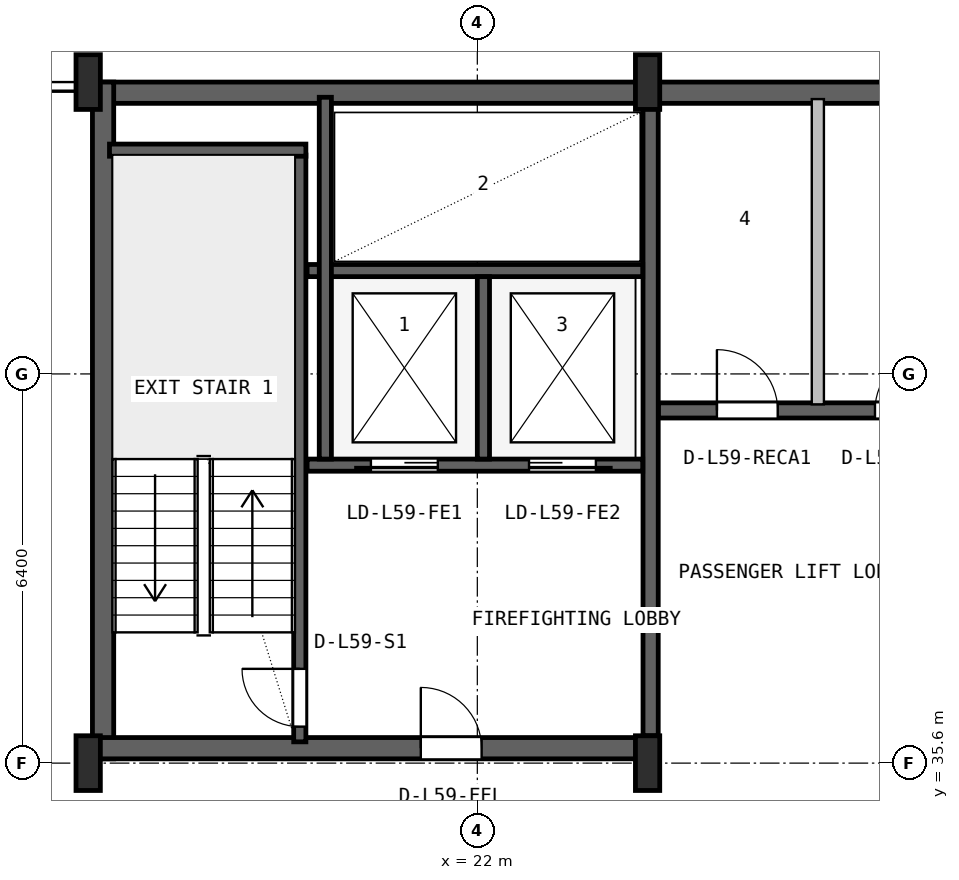
"""IFC4 building model, lengths in metres.
Left out: names, types, materials, properties, quantities, classifications, styles, units other than length and angle.
Written with IfcOpenShell. Run it as: python <this file> out.ifc"""

import sys

from ifc_helpers import new_model, si_unit, direction, frame, frame_2d, origin, origin_2d, place, context, subcontext, project, spatial, rectangle, i_section, extrude, source, transform, mapped, element, fill, save


model = new_model("IFC4")
c1 = context("Model", 3, precision=1e-05, world=origin(), true_north=direction((0.0, 1.0)))
c2 = subcontext(c1, "Body", "Model", "MODEL_VIEW")
j1 = project(units=[si_unit("LENGTHUNIT", "METRE"), si_unit("PLANEANGLEUNIT", "RADIAN")], contexts=[c1])
p1 = place(None, origin())
s1 = spatial("IfcSite", under=j1, at=p1, CompositionType="ELEMENT")
p2 = place(p1, origin())
s2 = spatial("IfcBuilding", under=s1, at=p2, CompositionType="ELEMENT")
p3 = place(p2, frame((0.0, 0.0, 239.4)))
s3 = spatial("IfcBuildingStorey", under=s2, at=p3, CompositionType="ELEMENT", Elevation=239.4)
p4 = place(p3, frame((15.6, 46.625, 0.0), z_axis=(0.0, 0.0, 1.0), x_axis=(1.0, 0.0, 0.0)))
e1 = element("IfcWall", 1, at=p4, inside=s3, PredefinedType="SHEAR", context=c2, shape_type="SweptSolid", body=[
    extrude(rectangle(XDim=36.8, YDim=0.35, at=frame_2d((18.4, 0.0))), origin(), (0.0, 0.0, 1.0), 3.55),
])
p5 = place(p3, frame((15.845, 35.67, 0.0), z_axis=(0.0, 0.0, 1.0), x_axis=(0.0, 1.0, 0.0)))
e2 = element("IfcWall", 2, at=p5, inside=s3, PredefinedType="SHEAR", context=c2, shape_type="SweptSolid", body=[
    extrude(rectangle(XDim=11.13, YDim=0.35, at=frame_2d((5.565, 0.0))), origin(), (0.0, 0.0, 1.0), 3.55),
])
p6 = place(p3, frame((15.67, 35.845, 0.0), z_axis=(0.0, 0.0, 1.0), x_axis=(1.0, 0.0, 0.0)))
e3 = element("IfcWall", 3, at=p6, inside=s3, PredefinedType="SHEAR", context=c2, shape_type="SweptSolid", body=[
    extrude(rectangle(XDim=9.13, YDim=0.35, at=frame_2d((4.565, 0.0))), origin(), (0.0, 0.0, 1.0), 3.55),
])
p7 = place(p6, frame((5.4, 0.0, 0.0)))
e4 = element("IfcOpeningElement", 4, at=p7, cuts=e3, PredefinedType="OPENING", context=c2, shape_type="SweptSolid", body=[
    extrude(rectangle(XDim=1.0, YDim=2.1, at=frame_2d((0.5, 1.05))), frame((0.0, 0.185, 0.0), z_axis=(0.0, -1.0, 0.0), x_axis=(1.0, 0.0, 0.0)), (0.0, 0.0, 1.0), 0.37),
])
m1 = source(origin(), c2, "Body", "SweptSolid", [
    extrude(i_section(OverallWidth=0.4, OverallDepth=0.9, WebThickness=0.016, FlangeThickness=0.028, FilletRadius=0.016, at=origin_2d()), origin(), (0.0, 0.0, 1.0), 3.8),
])
for number, where, z_axis, x_axis in (
    (5, (15.6, 35.6, 0.0), (0.0, 0.0, 1.0), (1.0, 0.0, 0.0)),
    (6, (15.6, 46.8, 0.0), (0.0, 0.0, 1.0), (1.0, 0.0, 0.0)),
    (7, (24.8, 35.6, 0.0), (0.0, 0.0, 1.0), (1.0, 0.0, 0.0)),
    (8, (24.8, 46.8, 0.0), (0.0, 0.0, 1.0), (1.0, 0.0, 0.0)),
):
    element("IfcColumn", number, at=place(p3, frame(where, z_axis=z_axis, x_axis=x_axis)), inside=s3, PredefinedType="COLUMN", context=c2, shape_type="MappedRepresentation", body=[
        mapped(m1, transform((0.0, 0.0, 0.0), x_axis=(1.0, 0.0, 0.0), y_axis=(0.0, 1.0, 0.0), z_axis=(0.0, 0.0, 1.0), scale=1.0)),
    ])
p8 = place(p3, frame((19.08, 35.95, 0.0), z_axis=(0.0, 0.0, 1.0), x_axis=(0.0, 1.0, 0.0)))
e9 = element("IfcWall", 9, at=p8, inside=s3, PredefinedType="SHEAR", context=c2, shape_type="SweptSolid", body=[
    extrude(rectangle(XDim=9.65, YDim=0.2, at=frame_2d((4.825, 0.0))), origin(), (0.0, 0.0, 1.0), 3.55),
])
p9 = place(p8, frame((0.25, 0.0, 0.0)))
e10 = element("IfcOpeningElement", 10, at=p9, cuts=e9, PredefinedType="OPENING", context=c2, shape_type="SweptSolid", body=[
    extrude(rectangle(XDim=0.95, YDim=2.1, at=frame_2d((0.475, 1.05))), frame((0.0, 0.11, 0.0), z_axis=(0.0, -1.0, 0.0), x_axis=(1.0, 0.0, 0.0)), (0.0, 0.0, 1.0), 0.22),
])
p10 = place(p3, frame((15.95, 45.68, 0.0), z_axis=(0.0, 0.0, 1.0), x_axis=(1.0, 0.0, 0.0)))
e11 = element("IfcWall", 11, at=p10, inside=s3, PredefinedType="SHEAR", context=c2, shape_type="SweptSolid", body=[
    extrude(rectangle(XDim=3.23, YDim=0.2, at=frame_2d((1.615, 0.0))), origin(), (0.0, 0.0, 1.0), 3.55),
])
p11 = place(p3, frame((24.85, 36.05, 0.0), z_axis=(0.0, 0.0, 1.0), x_axis=(0.0, 1.0, 0.0)))
e12 = element("IfcWall", 12, at=p11, inside=s3, PredefinedType="SHEAR", context=c2, shape_type="SweptSolid", body=[
    extrude(rectangle(XDim=10.45, YDim=0.25, at=frame_2d((5.225, 0.0))), origin(), (0.0, 0.0, 1.0), 3.55),
])
p12 = place(p3, frame((19.2, 40.5, 0.0), z_axis=(0.0, 0.0, 1.0), x_axis=(1.0, 0.0, 0.0)))
e13 = element("IfcWall", 13, at=p12, inside=s3, PredefinedType="SHEAR", context=c2, shape_type="SweptSolid", body=[
    extrude(rectangle(XDim=5.52, YDim=0.2, at=frame_2d((2.76, 0.0))), origin(), (0.0, 0.0, 1.0), 3.55),
])
p13 = place(p12, frame((1.05, 0.0, 0.0)))
e14 = element("IfcOpeningElement", 14, at=p13, cuts=e13, PredefinedType="OPENING", context=c2, shape_type="SweptSolid", body=[
    extrude(rectangle(XDim=1.1, YDim=2.18, at=frame_2d((0.55, 1.09))), frame((0.0, 0.11, 0.0), z_axis=(0.0, -1.0, 0.0), x_axis=(1.0, 0.0, 0.0)), (0.0, 0.0, 1.0), 0.22),
])
p14 = place(p12, frame((3.65, 0.0, 0.0)))
e15 = element("IfcOpeningElement", 15, at=p14, cuts=e13, PredefinedType="OPENING", context=c2, shape_type="SweptSolid", body=[
    extrude(rectangle(XDim=1.1, YDim=2.18, at=frame_2d((0.55, 1.09))), frame((0.0, 0.11, 0.0), z_axis=(0.0, -1.0, 0.0), x_axis=(1.0, 0.0, 0.0)), (0.0, 0.0, 1.0), 0.22),
])
p15 = place(p3, frame((19.2, 43.7, 0.0), z_axis=(0.0, 0.0, 1.0), x_axis=(1.0, 0.0, 0.0)))
e16 = element("IfcWall", 16, at=p15, inside=s3, PredefinedType="SHEAR", context=c2, shape_type="SweptSolid", body=[
    extrude(rectangle(XDim=5.52, YDim=0.2, at=frame_2d((2.76, 0.0))), origin(), (0.0, 0.0, 1.0), 3.55),
])
p16 = place(p3, frame((22.1, 40.6, 0.0), z_axis=(0.0, 0.0, 1.0), x_axis=(0.0, 1.0, 0.0)))
e17 = element("IfcWall", 17, at=p16, inside=s3, PredefinedType="SHEAR", context=c2, shape_type="SweptSolid", body=[
    extrude(rectangle(XDim=3.0, YDim=0.2, at=frame_2d((1.5, 0.0))), origin(), (0.0, 0.0, 1.0), 3.55),
])
p17 = place(p3, frame((19.5, 40.6, 0.0), z_axis=(0.0, 0.0, 1.0), x_axis=(0.0, 1.0, 0.0)))
e18 = element("IfcWall", 18, at=p17, inside=s3, PredefinedType="SHEAR", context=c2, shape_type="SweptSolid", body=[
    extrude(rectangle(XDim=5.95, YDim=0.2, at=frame_2d((2.975, 0.0))), origin(), (0.0, 0.0, 1.0), 3.55),
])
p18 = place(p3, frame((24.98, 41.4, 0.0), z_axis=(0.0, 0.0, 1.0), x_axis=(1.0, 0.0, 0.0)))
e19 = element("IfcWall", 19, at=p18, inside=s3, PredefinedType="SHEAR", context=c2, shape_type="SweptSolid", body=[
    extrude(rectangle(XDim=23.82, YDim=0.25, at=frame_2d((11.91, 0.0))), origin(), (0.0, 0.0, 1.0), 3.55),
])
p19 = place(p18, frame((16.87, 0.0, 0.0)))
e20 = element("IfcOpeningElement", 20, at=p19, cuts=e19, PredefinedType="OPENING", context=c2, shape_type="SweptSolid", body=[
    extrude(rectangle(XDim=1.1, YDim=2.18, at=frame_2d((0.55, 1.09))), frame((0.0, 0.135, 0.0), z_axis=(0.0, -1.0, 0.0), x_axis=(1.0, 0.0, 0.0)), (0.0, 0.0, 1.0), 0.27),
])
p20 = place(p18, frame((19.47, 0.0, 0.0)))
e21 = element("IfcOpeningElement", 21, at=p20, cuts=e19, PredefinedType="OPENING", context=c2, shape_type="SweptSolid", body=[
    extrude(rectangle(XDim=1.1, YDim=2.18, at=frame_2d((0.55, 1.09))), frame((0.0, 0.135, 0.0), z_axis=(0.0, -1.0, 0.0), x_axis=(1.0, 0.0, 0.0)), (0.0, 0.0, 1.0), 0.27),
])
p21 = place(p18, frame((22.07, 0.0, 0.0)))
e22 = element("IfcOpeningElement", 22, at=p21, cuts=e19, PredefinedType="OPENING", context=c2, shape_type="SweptSolid", body=[
    extrude(rectangle(XDim=1.1, YDim=2.18, at=frame_2d((0.55, 1.09))), frame((0.0, 0.135, 0.0), z_axis=(0.0, -1.0, 0.0), x_axis=(1.0, 0.0, 0.0)), (0.0, 0.0, 1.0), 0.27),
])
p22 = place(p18, frame((0.96, 0.0, 0.0)))
e23 = element("IfcOpeningElement", 23, at=p22, cuts=e19, PredefinedType="OPENING", context=c2, shape_type="SweptSolid", body=[
    extrude(rectangle(XDim=1.0, YDim=2.08, at=frame_2d((0.5, 1.04))), frame((0.0, 0.135, 0.0), z_axis=(0.0, -1.0, 0.0), x_axis=(1.0, 0.0, 0.0)), (0.0, 0.0, 1.0), 0.27),
])
p23 = place(p18, frame((3.56, 0.0, 0.0)))
e24 = element("IfcOpeningElement", 24, at=p23, cuts=e19, PredefinedType="OPENING", context=c2, shape_type="SweptSolid", body=[
    extrude(rectangle(XDim=1.0, YDim=2.08, at=frame_2d((0.5, 1.04))), frame((0.0, 0.135, 0.0), z_axis=(0.0, -1.0, 0.0), x_axis=(1.0, 0.0, 0.0)), (0.0, 0.0, 1.0), 0.27),
])
p24 = place(p18, frame((6.16, 0.0, 0.0)))
e25 = element("IfcOpeningElement", 25, at=p24, cuts=e19, PredefinedType="OPENING", context=c2, shape_type="SweptSolid", body=[
    extrude(rectangle(XDim=0.92, YDim=2.08, at=frame_2d((0.46, 1.04))), frame((0.0, 0.135, 0.0), z_axis=(0.0, -1.0, 0.0), x_axis=(1.0, 0.0, 0.0)), (0.0, 0.0, 1.0), 0.27),
])
p25 = place(p18, frame((11.56, 0.0, 0.0)))
e26 = element("IfcOpeningElement", 26, at=p25, cuts=e19, PredefinedType="OPENING", context=c2, shape_type="SweptSolid", body=[
    extrude(rectangle(XDim=1.0, YDim=2.08, at=frame_2d((0.5, 1.04))), frame((0.0, 0.135, 0.0), z_axis=(0.0, -1.0, 0.0), x_axis=(1.0, 0.0, 0.0)), (0.0, 0.0, 1.0), 0.27),
])
p26 = place(p3, frame((27.6, 41.5, 0.0), z_axis=(0.0, 0.0, 1.0), x_axis=(0.0, 1.0, 0.0)))
e27 = element("IfcWall", 27, at=p26, inside=s3, PredefinedType="SOLIDWALL", context=c2, shape_type="SweptSolid", body=[
    extrude(rectangle(XDim=5.02, YDim=0.2, at=frame_2d((2.51, 0.0))), origin(), (0.0, 0.0, 1.0), 3.53),
])
m2 = source(origin(), c2, "Body", "SweptSolid", [
    extrude(rectangle(XDim=0.95, YDim=2.1, at=frame_2d((0.475, 1.05))), frame((0.0, 0.025, 0.0), z_axis=(0.0, -1.0, 0.0), x_axis=(1.0, 0.0, 0.0)), (0.0, 0.0, 1.0), 0.05),
])
p27 = place(p9, origin())
e28 = element("IfcDoor", 28, at=p27, inside=s3, OperationType="SINGLE_SWING_RIGHT", PredefinedType="DOOR", context=c2, shape_type="MappedRepresentation", body=[
    mapped(m2, transform((0.0, 0.0, 0.0), x_axis=(1.0, 0.0, 0.0), y_axis=(0.0, 1.0, 0.0), z_axis=(0.0, 0.0, 1.0), scale=1.0)),
])
fill(e10, e28)
m3 = source(origin(), c2, "Body", "SweptSolid", [
    extrude(rectangle(XDim=1.0, YDim=2.1, at=frame_2d((0.5, 1.05))), frame((0.0, 0.025, 0.0), z_axis=(0.0, -1.0, 0.0), x_axis=(1.0, 0.0, 0.0)), (0.0, 0.0, 1.0), 0.05),
])
p28 = place(p7, origin())
e29 = element("IfcDoor", 29, at=p28, inside=s3, OperationType="SINGLE_SWING_LEFT", PredefinedType="DOOR", context=c2, shape_type="MappedRepresentation", body=[
    mapped(m3, transform((0.0, 0.0, 0.0), x_axis=(1.0, 0.0, 0.0), y_axis=(0.0, 1.0, 0.0), z_axis=(0.0, 0.0, 1.0), scale=1.0)),
])
fill(e4, e29)
m4 = source(origin(), c2, "Body", "SweptSolid", [
    extrude(rectangle(XDim=1.1, YDim=2.18, at=frame_2d((0.55, 1.09))), frame((0.0, 0.025, 0.0), z_axis=(0.0, -1.0, 0.0), x_axis=(1.0, 0.0, 0.0)), (0.0, 0.0, 1.0), 0.05),
])
p29 = place(p13, frame((1.1, 0.0, 0.0), z_axis=(0.0, 0.0, 1.0), x_axis=(-1.0, 0.0, 0.0)))
e30 = element("IfcDoor", 30, at=p29, inside=s3, OperationType="SLIDING_TO_LEFT", PredefinedType="DOOR", context=c2, shape_type="MappedRepresentation", body=[
    mapped(m4, transform((0.0, 0.0, 0.0), x_axis=(1.0, 0.0, 0.0), y_axis=(0.0, 1.0, 0.0), z_axis=(0.0, 0.0, 1.0), scale=1.0)),
])
fill(e14, e30)
p30 = place(p14, frame((1.1, 0.0, 0.0), z_axis=(0.0, 0.0, 1.0), x_axis=(-1.0, 0.0, 0.0)))
e31 = element("IfcDoor", 31, at=p30, inside=s3, OperationType="SLIDING_TO_RIGHT", PredefinedType="DOOR", context=c2, shape_type="MappedRepresentation", body=[
    mapped(m4, transform((0.0, 0.0, 0.0), x_axis=(1.0, 0.0, 0.0), y_axis=(0.0, 1.0, 0.0), z_axis=(0.0, 0.0, 1.0), scale=1.0)),
])
fill(e15, e31)
m5 = source(origin(), c2, "Body", "SweptSolid", [
    extrude(rectangle(XDim=1.0, YDim=2.08, at=frame_2d((0.5, 1.04))), frame((0.0, 0.025, 0.0), z_axis=(0.0, -1.0, 0.0), x_axis=(1.0, 0.0, 0.0)), (0.0, 0.0, 1.0), 0.05),
])
p31 = place(p22, origin())
e32 = element("IfcDoor", 32, at=p31, inside=s3, OperationType="SINGLE_SWING_LEFT", PredefinedType="DOOR", context=c2, shape_type="MappedRepresentation", body=[
    mapped(m5, transform((0.0, 0.0, 0.0), x_axis=(1.0, 0.0, 0.0), y_axis=(0.0, 1.0, 0.0), z_axis=(0.0, 0.0, 1.0), scale=1.0)),
])
fill(e23, e32)
p32 = place(p23, origin())
e33 = element("IfcDoor", 33, at=p32, inside=s3, OperationType="SINGLE_SWING_RIGHT", PredefinedType="DOOR", context=c2, shape_type="MappedRepresentation", body=[
    mapped(m5, transform((0.0, 0.0, 0.0), x_axis=(1.0, 0.0, 0.0), y_axis=(0.0, 1.0, 0.0), z_axis=(0.0, 0.0, 1.0), scale=1.0)),
])
fill(e24, e33)
save(model, sys.argv[1])
